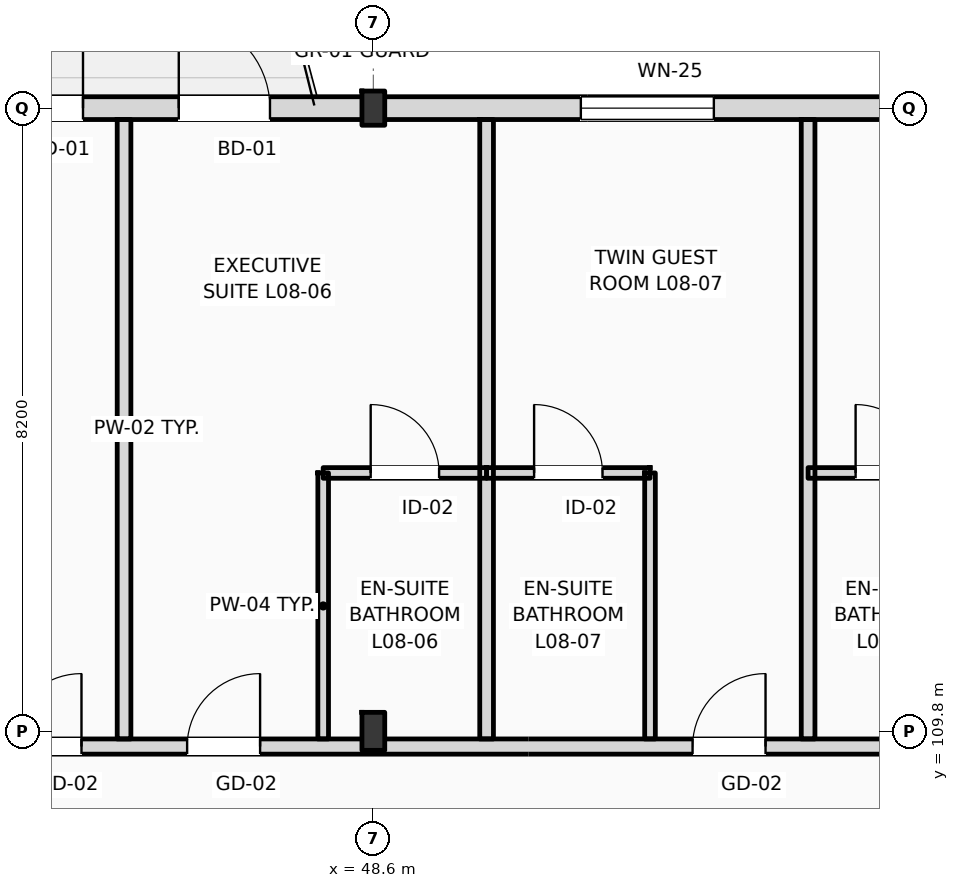
"""IFC4 building model, lengths in metres.
Left out: names, types, materials, properties, quantities, classifications, styles, units other than length and angle.
Written with IfcOpenShell. Run it as: python <this file> out.ifc"""

import sys

from ifc_helpers import new_model, si_unit, direction, frame, frame_2d, origin, origin_2d, place, context, subcontext, project, spatial, rectangle, i_section, extrude, element, fill, save


model = new_model("IFC4")
c1 = context("Model", 3, precision=1e-05, world=origin(), true_north=direction((0.0, 1.0)))
c2 = subcontext(c1, "Body", "Model", "MODEL_VIEW")
j1 = project(units=[si_unit("LENGTHUNIT", "METRE"), si_unit("PLANEANGLEUNIT", "RADIAN")], contexts=[c1])
p1 = place(None, origin())
s1 = spatial("IfcSite", under=j1, at=p1, CompositionType="ELEMENT")
p2 = place(p1, origin())
s2 = spatial("IfcBuilding", under=s1, at=p2, CompositionType="ELEMENT")
p3 = place(p2, frame((0.0, 0.0, 35.4)))
s3 = spatial("IfcBuildingStorey", under=s2, at=p3, CompositionType="ELEMENT", Elevation=35.4)
p4 = place(p3, frame((48.6, 109.8, 0.0), z_axis=(0.0, 0.0, 1.0), x_axis=(1.0, 0.0, 0.0)))
e1 = element("IfcColumn", 1, at=p4, inside=s3, PredefinedType="COLUMN", context=c2, shape_type="SweptSolid", body=[
    extrude(i_section(OverallWidth=0.3, OverallDepth=0.5, WebThickness=0.014, FlangeThickness=0.028, FilletRadius=0.027, at=origin_2d()), origin(), (0.0, 0.0, 1.0), 3.6),
])
p5 = place(p3, frame((48.6, 118.0, 0.0), z_axis=(0.0, 0.0, 1.0), x_axis=(1.0, 0.0, 0.0)))
e2 = element("IfcColumn", 2, at=p5, inside=s3, PredefinedType="COLUMN", context=c2, shape_type="SweptSolid", body=[
    extrude(i_section(OverallWidth=0.3, OverallDepth=0.45, WebThickness=0.014, FlangeThickness=0.026, FilletRadius=0.027, at=origin_2d()), origin(), (0.0, 0.0, 1.0), 3.6),
])
p6 = place(p3, frame((22.5, 118.0, 0.0), z_axis=(0.0, 0.0, 1.0), x_axis=(1.0, 0.0, 0.0)))
e3 = element("IfcWall", 3, at=p6, inside=s3, PredefinedType="STANDARD", context=c2, shape_type="SweptSolid", body=[
    extrude(rectangle(XDim=72.9, YDim=0.3, at=frame_2d((36.45, 0.0))), origin(), (0.0, 0.0, 1.0), 2.92),
])
p7 = place(p6, frame((0.91, 0.0, 0.9)))
e4 = element("IfcOpeningElement", 4, at=p7, cuts=e3, PredefinedType="OPENING", context=c2, shape_type="SweptSolid", body=[
    extrude(rectangle(XDim=0.9, YDim=1.84, at=frame_2d((0.45, 0.92))), frame((0.0, 0.16, 0.0), z_axis=(0.0, -1.0, 0.0), x_axis=(1.0, 0.0, 0.0)), (0.0, 0.0, 1.0), 0.32),
])
p8 = place(p6, frame((6.665, 0.0, 0.0)))
e5 = element("IfcOpeningElement", 5, at=p8, cuts=e3, PredefinedType="OPENING", context=c2, shape_type="SweptSolid", body=[
    extrude(rectangle(XDim=1.2, YDim=2.25, at=frame_2d((0.6, 1.125))), frame((0.0, 0.16, 0.0), z_axis=(0.0, -1.0, 0.0), x_axis=(1.0, 0.0, 0.0)), (0.0, 0.0, 1.0), 0.32),
])
p9 = place(p6, frame((11.355, 0.0, 0.9)))
e6 = element("IfcOpeningElement", 6, at=p9, cuts=e3, PredefinedType="OPENING", context=c2, shape_type="SweptSolid", body=[
    extrude(rectangle(XDim=1.1, YDim=1.5, at=frame_2d((0.55, 0.75))), frame((0.0, 0.16, 0.0), z_axis=(0.0, -1.0, 0.0), x_axis=(1.0, 0.0, 0.0)), (0.0, 0.0, 1.0), 0.32),
])
p10 = place(p6, frame((15.58, 0.0, 0.9)))
e7 = element("IfcOpeningElement", 7, at=p10, cuts=e3, PredefinedType="OPENING", context=c2, shape_type="SweptSolid", body=[
    extrude(rectangle(XDim=1.25, YDim=1.6, at=frame_2d((0.625, 0.8))), frame((0.0, 0.16, 0.0), z_axis=(0.0, -1.0, 0.0), x_axis=(1.0, 0.0, 0.0)), (0.0, 0.0, 1.0), 0.32),
])
p11 = place(p6, frame((21.08, 0.0, 0.0)))
e8 = element("IfcOpeningElement", 8, at=p11, cuts=e3, PredefinedType="OPENING", context=c2, shape_type="SweptSolid", body=[
    extrude(rectangle(XDim=1.2, YDim=2.25, at=frame_2d((0.6, 1.125))), frame((0.0, 0.16, 0.0), z_axis=(0.0, -1.0, 0.0), x_axis=(1.0, 0.0, 0.0)), (0.0, 0.0, 1.0), 0.32),
])
p12 = place(p6, frame((23.54, 0.0, 0.0)))
e9 = element("IfcOpeningElement", 9, at=p12, cuts=e3, PredefinedType="OPENING", context=c2, shape_type="SweptSolid", body=[
    extrude(rectangle(XDim=1.2, YDim=2.25, at=frame_2d((0.6, 1.125))), frame((0.0, 0.16, 0.0), z_axis=(0.0, -1.0, 0.0), x_axis=(1.0, 0.0, 0.0)), (0.0, 0.0, 1.0), 0.32),
])
p13 = place(p6, frame((28.83, 0.0, 0.9)))
e10 = element("IfcOpeningElement", 10, at=p13, cuts=e3, PredefinedType="OPENING", context=c2, shape_type="SweptSolid", body=[
    extrude(rectangle(XDim=1.75, YDim=1.84, at=frame_2d((0.875, 0.92))), frame((0.0, 0.16, 0.0), z_axis=(0.0, -1.0, 0.0), x_axis=(1.0, 0.0, 0.0)), (0.0, 0.0, 1.0), 0.32),
])
p14 = place(p6, frame((34.805, 0.0, 0.9)))
e11 = element("IfcOpeningElement", 11, at=p14, cuts=e3, PredefinedType="OPENING", context=c2, shape_type="SweptSolid", body=[
    extrude(rectangle(XDim=1.35, YDim=1.84, at=frame_2d((0.675, 0.92))), frame((0.0, 0.16, 0.0), z_axis=(0.0, -1.0, 0.0), x_axis=(1.0, 0.0, 0.0)), (0.0, 0.0, 1.0), 0.32),
])
p15 = place(p6, frame((38.105, 0.0, 0.0)))
e12 = element("IfcOpeningElement", 12, at=p15, cuts=e3, PredefinedType="OPENING", context=c2, shape_type="SweptSolid", body=[
    extrude(rectangle(XDim=1.2, YDim=2.25, at=frame_2d((0.6, 1.125))), frame((0.0, 0.16, 0.0), z_axis=(0.0, -1.0, 0.0), x_axis=(1.0, 0.0, 0.0)), (0.0, 0.0, 1.0), 0.32),
])
p16 = place(p6, frame((42.505, 0.0, 0.9)))
e13 = element("IfcOpeningElement", 13, at=p16, cuts=e3, PredefinedType="OPENING", context=c2, shape_type="SweptSolid", body=[
    extrude(rectangle(XDim=2.6, YDim=1.84, at=frame_2d((1.3, 0.92))), frame((0.0, 0.16, 0.0), z_axis=(0.0, -1.0, 0.0), x_axis=(1.0, 0.0, 0.0)), (0.0, 0.0, 1.0), 0.32),
])
p17 = place(p6, frame((46.2, 0.0, 0.9)))
e14 = element("IfcOpeningElement", 14, at=p17, cuts=e3, PredefinedType="OPENING", context=c2, shape_type="SweptSolid", body=[
    extrude(rectangle(XDim=1.8, YDim=1.84, at=frame_2d((0.9, 0.92))), frame((0.0, 0.16, 0.0), z_axis=(0.0, -1.0, 0.0), x_axis=(1.0, 0.0, 0.0)), (0.0, 0.0, 1.0), 0.32),
])
p18 = place(p6, frame((52.565, 0.0, 0.0)))
e15 = element("IfcOpeningElement", 15, at=p18, cuts=e3, PredefinedType="OPENING", context=c2, shape_type="SweptSolid", body=[
    extrude(rectangle(XDim=1.2, YDim=2.25, at=frame_2d((0.6, 1.125))), frame((0.0, 0.16, 0.0), z_axis=(0.0, -1.0, 0.0), x_axis=(1.0, 0.0, 0.0)), (0.0, 0.0, 1.0), 0.32),
])
p19 = place(p6, frame((55.305, 0.0, 0.9)))
e16 = element("IfcOpeningElement", 16, at=p19, cuts=e3, PredefinedType="OPENING", context=c2, shape_type="SweptSolid", body=[
    extrude(rectangle(XDim=1.2, YDim=1.8, at=frame_2d((0.6, 0.9))), frame((0.0, 0.16, 0.0), z_axis=(0.0, -1.0, 0.0), x_axis=(1.0, 0.0, 0.0)), (0.0, 0.0, 1.0), 0.32),
])
p20 = place(p6, frame((60.53, 0.0, 0.9)))
e17 = element("IfcOpeningElement", 17, at=p20, cuts=e3, PredefinedType="OPENING", context=c2, shape_type="SweptSolid", body=[
    extrude(rectangle(XDim=1.35, YDim=1.84, at=frame_2d((0.675, 0.92))), frame((0.0, 0.16, 0.0), z_axis=(0.0, -1.0, 0.0), x_axis=(1.0, 0.0, 0.0)), (0.0, 0.0, 1.0), 0.32),
])
p21 = place(p6, frame((65.955, 0.0, 0.9)))
e18 = element("IfcOpeningElement", 18, at=p21, cuts=e3, PredefinedType="OPENING", context=c2, shape_type="SweptSolid", body=[
    extrude(rectangle(XDim=1.35, YDim=1.84, at=frame_2d((0.675, 0.92))), frame((0.0, 0.16, 0.0), z_axis=(0.0, -1.0, 0.0), x_axis=(1.0, 0.0, 0.0)), (0.0, 0.0, 1.0), 0.32),
])
p22 = place(p6, frame((69.335, 0.0, 0.9)))
e19 = element("IfcOpeningElement", 19, at=p22, cuts=e3, PredefinedType="OPENING", context=c2, shape_type="SweptSolid", body=[
    extrude(rectangle(XDim=1.65, YDim=1.84, at=frame_2d((0.825, 0.92))), frame((0.0, 0.16, 0.0), z_axis=(0.0, -1.0, 0.0), x_axis=(1.0, 0.0, 0.0)), (0.0, 0.0, 1.0), 0.32),
])
p23 = place(p3, frame((10.65, 109.6, 0.0), z_axis=(0.0, 0.0, 1.0), x_axis=(1.0, 0.0, 0.0)))
e20 = element("IfcWall", 20, at=p23, inside=s3, PredefinedType="PARTITIONING", context=c2, shape_type="SweptSolid", body=[
    extrude(rectangle(XDim=84.61, YDim=0.2, at=frame_2d((42.305, 0.0))), origin(), (0.0, 0.0, 1.0), 2.82),
])
p24 = place(p23, frame((12.675, 0.0, 0.0)))
e21 = element("IfcOpeningElement", 21, at=p24, cuts=e20, PredefinedType="OPENING", context=c2, shape_type="SweptSolid", body=[
    extrude(rectangle(XDim=1.02, YDim=2.2, at=frame_2d((0.51, 1.1))), frame((0.0, 0.11, 0.0), z_axis=(0.0, -1.0, 0.0), x_axis=(1.0, 0.0, 0.0)), (0.0, 0.0, 1.0), 0.22),
])
p25 = place(p23, frame((19.62, 0.0, 0.0)))
e22 = element("IfcOpeningElement", 22, at=p25, cuts=e20, PredefinedType="OPENING", context=c2, shape_type="SweptSolid", body=[
    extrude(rectangle(XDim=1.02, YDim=2.2, at=frame_2d((0.51, 1.1))), frame((0.0, 0.11, 0.0), z_axis=(0.0, -1.0, 0.0), x_axis=(1.0, 0.0, 0.0)), (0.0, 0.0, 1.0), 0.22),
])
p26 = place(p23, frame((24.12, 0.0, 0.0)))
e23 = element("IfcOpeningElement", 23, at=p26, cuts=e20, PredefinedType="OPENING", context=c2, shape_type="SweptSolid", body=[
    extrude(rectangle(XDim=1.02, YDim=2.2, at=frame_2d((0.51, 1.1))), frame((0.0, 0.11, 0.0), z_axis=(0.0, -1.0, 0.0), x_axis=(1.0, 0.0, 0.0)), (0.0, 0.0, 1.0), 0.22),
])
p27 = place(p23, frame((26.47, 0.0, 0.0)))
e24 = element("IfcOpeningElement", 24, at=p27, cuts=e20, PredefinedType="OPENING", context=c2, shape_type="SweptSolid", body=[
    extrude(rectangle(XDim=1.02, YDim=2.2, at=frame_2d((0.51, 1.1))), frame((0.0, 0.11, 0.0), z_axis=(0.0, -1.0, 0.0), x_axis=(1.0, 0.0, 0.0)), (0.0, 0.0, 1.0), 0.22),
])
p28 = place(p23, frame((33.15, 0.0, 0.0)))
e25 = element("IfcOpeningElement", 25, at=p28, cuts=e20, PredefinedType="OPENING", context=c2, shape_type="SweptSolid", body=[
    extrude(rectangle(XDim=0.96, YDim=2.2, at=frame_2d((0.48, 1.1))), frame((0.0, 0.11, 0.0), z_axis=(0.0, -1.0, 0.0), x_axis=(1.0, 0.0, 0.0)), (0.0, 0.0, 1.0), 0.22),
])
p29 = place(p23, frame((35.5, 0.0, 0.0)))
e26 = element("IfcOpeningElement", 26, at=p29, cuts=e20, PredefinedType="OPENING", context=c2, shape_type="SweptSolid", body=[
    extrude(rectangle(XDim=0.96, YDim=2.2, at=frame_2d((0.48, 1.1))), frame((0.0, 0.11, 0.0), z_axis=(0.0, -1.0, 0.0), x_axis=(1.0, 0.0, 0.0)), (0.0, 0.0, 1.0), 0.22),
])
p30 = place(p23, frame((42.15, 0.0, 0.0)))
e27 = element("IfcOpeningElement", 27, at=p30, cuts=e20, PredefinedType="OPENING", context=c2, shape_type="SweptSolid", body=[
    extrude(rectangle(XDim=0.96, YDim=2.2, at=frame_2d((0.48, 1.1))), frame((0.0, 0.11, 0.0), z_axis=(0.0, -1.0, 0.0), x_axis=(1.0, 0.0, 0.0)), (0.0, 0.0, 1.0), 0.22),
])
p31 = place(p23, frame((47.15, 0.0, 0.0)))
e28 = element("IfcOpeningElement", 28, at=p31, cuts=e20, PredefinedType="OPENING", context=c2, shape_type="SweptSolid", body=[
    extrude(rectangle(XDim=0.96, YDim=2.2, at=frame_2d((0.48, 1.1))), frame((0.0, 0.11, 0.0), z_axis=(0.0, -1.0, 0.0), x_axis=(1.0, 0.0, 0.0)), (0.0, 0.0, 1.0), 0.22),
])
p32 = place(p23, frame((51.15, 0.0, 0.0)))
e29 = element("IfcOpeningElement", 29, at=p32, cuts=e20, PredefinedType="OPENING", context=c2, shape_type="SweptSolid", body=[
    extrude(rectangle(XDim=0.96, YDim=2.2, at=frame_2d((0.48, 1.1))), frame((0.0, 0.11, 0.0), z_axis=(0.0, -1.0, 0.0), x_axis=(1.0, 0.0, 0.0)), (0.0, 0.0, 1.0), 0.22),
])
p33 = place(p23, frame((55.65, 0.0, 0.0)))
e30 = element("IfcOpeningElement", 30, at=p33, cuts=e20, PredefinedType="OPENING", context=c2, shape_type="SweptSolid", body=[
    extrude(rectangle(XDim=0.96, YDim=2.2, at=frame_2d((0.48, 1.1))), frame((0.0, 0.11, 0.0), z_axis=(0.0, -1.0, 0.0), x_axis=(1.0, 0.0, 0.0)), (0.0, 0.0, 1.0), 0.22),
])
p34 = place(p23, frame((58.0, 0.0, 0.0)))
e31 = element("IfcOpeningElement", 31, at=p34, cuts=e20, PredefinedType="OPENING", context=c2, shape_type="SweptSolid", body=[
    extrude(rectangle(XDim=0.96, YDim=2.2, at=frame_2d((0.48, 1.1))), frame((0.0, 0.11, 0.0), z_axis=(0.0, -1.0, 0.0), x_axis=(1.0, 0.0, 0.0)), (0.0, 0.0, 1.0), 0.22),
])
p35 = place(p23, frame((64.65, 0.0, 0.0)))
e32 = element("IfcOpeningElement", 32, at=p35, cuts=e20, PredefinedType="OPENING", context=c2, shape_type="SweptSolid", body=[
    extrude(rectangle(XDim=0.96, YDim=2.2, at=frame_2d((0.48, 1.1))), frame((0.0, 0.11, 0.0), z_axis=(0.0, -1.0, 0.0), x_axis=(1.0, 0.0, 0.0)), (0.0, 0.0, 1.0), 0.22),
])
p36 = place(p23, frame((66.75, 0.0, 0.0)))
e33 = element("IfcOpeningElement", 33, at=p36, cuts=e20, PredefinedType="OPENING", context=c2, shape_type="SweptSolid", body=[
    extrude(rectangle(XDim=0.96, YDim=2.2, at=frame_2d((0.48, 1.1))), frame((0.0, 0.11, 0.0), z_axis=(0.0, -1.0, 0.0), x_axis=(1.0, 0.0, 0.0)), (0.0, 0.0, 1.0), 0.22),
])
p37 = place(p23, frame((73.65, 0.0, 0.0)))
e34 = element("IfcOpeningElement", 34, at=p37, cuts=e20, PredefinedType="OPENING", context=c2, shape_type="SweptSolid", body=[
    extrude(rectangle(XDim=0.96, YDim=2.2, at=frame_2d((0.48, 1.1))), frame((0.0, 0.11, 0.0), z_axis=(0.0, -1.0, 0.0), x_axis=(1.0, 0.0, 0.0)), (0.0, 0.0, 1.0), 0.22),
])
p38 = place(p23, frame((78.4, 0.0, 0.0)))
e35 = element("IfcOpeningElement", 35, at=p38, cuts=e20, PredefinedType="OPENING", context=c2, shape_type="SweptSolid", body=[
    extrude(rectangle(XDim=0.96, YDim=2.2, at=frame_2d((0.48, 1.1))), frame((0.0, 0.11, 0.0), z_axis=(0.0, -1.0, 0.0), x_axis=(1.0, 0.0, 0.0)), (0.0, 0.0, 1.0), 0.22),
])
p39 = place(p23, frame((80.455, 0.0, 0.0)))
e36 = element("IfcOpeningElement", 36, at=p39, cuts=e20, PredefinedType="OPENING", context=c2, shape_type="SweptSolid", body=[
    extrude(rectangle(XDim=0.96, YDim=2.2, at=frame_2d((0.48, 1.1))), frame((0.0, 0.11, 0.0), z_axis=(0.0, -1.0, 0.0), x_axis=(1.0, 0.0, 0.0)), (0.0, 0.0, 1.0), 0.22),
])
p40 = place(p23, frame((2.716, 0.0, 0.0)))
e37 = element("IfcOpeningElement", 37, at=p40, cuts=e20, PredefinedType="OPENING", context=c2, shape_type="SweptSolid", body=[
    extrude(rectangle(XDim=1.35, YDim=2.25, at=frame_2d((0.675, 1.125))), frame((0.0, 0.11, 0.0), z_axis=(0.0, -1.0, 0.0), x_axis=(1.0, 0.0, 0.0)), (0.0, 0.0, 1.0), 0.22),
])
p41 = place(p23, frame((6.65, 0.0, 0.0)))
e38 = element("IfcOpeningElement", 38, at=p41, cuts=e20, PredefinedType="OPENING", context=c2, shape_type="SweptSolid", body=[
    extrude(rectangle(XDim=1.35, YDim=2.25, at=frame_2d((0.675, 1.125))), frame((0.0, 0.11, 0.0), z_axis=(0.0, -1.0, 0.0), x_axis=(1.0, 0.0, 0.0)), (0.0, 0.0, 1.0), 0.22),
])
p42 = place(p23, frame((10.583, 0.0, 0.0)))
e39 = element("IfcOpeningElement", 39, at=p42, cuts=e20, PredefinedType="OPENING", context=c2, shape_type="SweptSolid", body=[
    extrude(rectangle(XDim=1.35, YDim=2.25, at=frame_2d((0.675, 1.125))), frame((0.0, 0.11, 0.0), z_axis=(0.0, -1.0, 0.0), x_axis=(1.0, 0.0, 0.0)), (0.0, 0.0, 1.0), 0.22),
])
for number, where, z_axis, x_axis in (
    (40, (45.32, 109.7, 0.0), (0.0, 0.0, 1.0), (0.0, 1.0, 0.0)),
    (41, (50.09, 109.7, 0.0), (0.0, 0.0, 1.0), (0.0, 1.0, 0.0)),
):
    element("IfcWall", number, at=place(p3, frame(where, z_axis=z_axis, x_axis=x_axis)), inside=s3, PredefinedType="PARTITIONING", context=c2, shape_type="SweptSolid", body=[
        extrude(rectangle(XDim=8.15, YDim=0.18, at=frame_2d((4.075, 0.0))), origin(), (0.0, 0.0, 1.0), 3.38),
    ])
p43 = place(p3, frame((47.94, 109.7, 0.0), z_axis=(0.0, 0.0, 1.0), x_axis=(0.0, 1.0, 0.0)))
e42 = element("IfcWall", 42, at=p43, inside=s3, PredefinedType="PARTITIONING", context=c2, shape_type="SweptSolid", body=[
    extrude(rectangle(XDim=3.5, YDim=0.14, at=frame_2d((1.75, 0.0))), origin(), (0.0, 0.0, 1.0), 3.38),
])
p44 = place(p3, frame((47.94, 113.2, 0.0), z_axis=(0.0, 0.0, 1.0), x_axis=(1.0, 0.0, 0.0)))
e43 = element("IfcWall", 43, at=p44, inside=s3, PredefinedType="PARTITIONING", context=c2, shape_type="SweptSolid", body=[
    extrude(rectangle(XDim=2.15, YDim=0.14, at=frame_2d((1.075, 0.0))), origin(), (0.0, 0.0, 1.0), 3.38),
])
p45 = place(p44, frame((0.625, 0.0, 0.0)))
e44 = element("IfcOpeningElement", 44, at=p45, cuts=e43, PredefinedType="OPENING", context=c2, shape_type="SweptSolid", body=[
    extrude(rectangle(XDim=0.9, YDim=2.1, at=frame_2d((0.45, 1.05))), frame((0.0, 0.08, 0.0), z_axis=(0.0, -1.0, 0.0), x_axis=(1.0, 0.0, 0.0)), (0.0, 0.0, 1.0), 0.16),
])
p46 = place(p3, frame((54.32, 109.7, 0.0), z_axis=(0.0, 0.0, 1.0), x_axis=(0.0, 1.0, 0.0)))
e45 = element("IfcWall", 45, at=p46, inside=s3, PredefinedType="PARTITIONING", context=c2, shape_type="SweptSolid", body=[
    extrude(rectangle(XDim=8.15, YDim=0.18, at=frame_2d((4.075, 0.0))), origin(), (0.0, 0.0, 1.0), 3.38),
])
p47 = place(p3, frame((52.24, 109.7, 0.0), z_axis=(0.0, 0.0, 1.0), x_axis=(0.0, 1.0, 0.0)))
e46 = element("IfcWall", 46, at=p47, inside=s3, PredefinedType="PARTITIONING", context=c2, shape_type="SweptSolid", body=[
    extrude(rectangle(XDim=3.5, YDim=0.14, at=frame_2d((1.75, 0.0))), origin(), (0.0, 0.0, 1.0), 3.38),
])
p48 = place(p3, frame((50.09, 113.2, 0.0), z_axis=(0.0, 0.0, 1.0), x_axis=(1.0, 0.0, 0.0)))
e47 = element("IfcWall", 47, at=p48, inside=s3, PredefinedType="PARTITIONING", context=c2, shape_type="SweptSolid", body=[
    extrude(rectangle(XDim=2.15, YDim=0.14, at=frame_2d((1.075, 0.0))), origin(), (0.0, 0.0, 1.0), 3.38),
])
p49 = place(p48, frame((0.625, 0.0, 0.0)))
e48 = element("IfcOpeningElement", 48, at=p49, cuts=e47, PredefinedType="OPENING", context=c2, shape_type="SweptSolid", body=[
    extrude(rectangle(XDim=0.9, YDim=2.1, at=frame_2d((0.45, 1.05))), frame((0.0, 0.08, 0.0), z_axis=(0.0, -1.0, 0.0), x_axis=(1.0, 0.0, 0.0)), (0.0, 0.0, 1.0), 0.16),
])
p50 = place(p3, frame((54.32, 113.2, 0.0), z_axis=(0.0, 0.0, 1.0), x_axis=(1.0, 0.0, 0.0)))
e49 = element("IfcWall", 49, at=p50, inside=s3, PredefinedType="PARTITIONING", context=c2, shape_type="SweptSolid", body=[
    extrude(rectangle(XDim=2.15, YDim=0.14, at=frame_2d((1.075, 0.0))), origin(), (0.0, 0.0, 1.0), 3.38),
])
p51 = place(p50, frame((0.625, 0.0, 0.0)))
e50 = element("IfcOpeningElement", 50, at=p51, cuts=e49, PredefinedType="OPENING", context=c2, shape_type="SweptSolid", body=[
    extrude(rectangle(XDim=0.9, YDim=2.1, at=frame_2d((0.45, 1.05))), frame((0.0, 0.08, 0.0), z_axis=(0.0, -1.0, 0.0), x_axis=(1.0, 0.0, 0.0)), (0.0, 0.0, 1.0), 0.16),
])
p52 = place(p11, origin())
e51 = element("IfcDoor", 51, at=p52, inside=s3, OperationType="SINGLE_SWING_RIGHT", PredefinedType="DOOR", context=c2, shape_type="SweptSolid", body=[
    extrude(rectangle(XDim=1.2, YDim=2.25, at=frame_2d((0.6, 1.125))), frame((0.0, 0.025, 0.0), z_axis=(0.0, -1.0, 0.0), x_axis=(1.0, 0.0, 0.0)), (0.0, 0.0, 1.0), 0.05),
])
fill(e8, e51)
p53 = place(p12, origin())
e52 = element("IfcDoor", 52, at=p53, inside=s3, OperationType="SINGLE_SWING_LEFT", PredefinedType="DOOR", context=c2, shape_type="SweptSolid", body=[
    extrude(rectangle(XDim=1.2, YDim=2.25, at=frame_2d((0.6, 1.125))), frame((0.0, 0.025, 0.0), z_axis=(0.0, -1.0, 0.0), x_axis=(1.0, 0.0, 0.0)), (0.0, 0.0, 1.0), 0.05),
])
fill(e9, e52)
p54 = place(p13, origin())
e53 = element("IfcWindow", 53, at=p54, inside=s3, PartitioningType="DOUBLE_PANEL_VERTICAL", PredefinedType="WINDOW", context=c2, shape_type="SweptSolid", body=[
    extrude(rectangle(XDim=1.75, YDim=1.84, at=frame_2d((0.875, 0.92))), frame((0.0, 0.03, 0.0), z_axis=(0.0, -1.0, 0.0), x_axis=(1.0, 0.0, 0.0)), (0.0, 0.0, 1.0), 0.06),
])
fill(e10, e53)
p55 = place(p28, origin())
e54 = element("IfcDoor", 54, at=p55, inside=s3, OperationType="SINGLE_SWING_RIGHT", PredefinedType="DOOR", context=c2, shape_type="SweptSolid", body=[
    extrude(rectangle(XDim=0.96, YDim=2.2, at=frame_2d((0.48, 1.1))), frame((0.0, 0.025, 0.0), z_axis=(0.0, -1.0, 0.0), x_axis=(1.0, 0.0, 0.0)), (0.0, 0.0, 1.0), 0.05),
])
fill(e25, e54)
p56 = place(p29, origin())
e55 = element("IfcDoor", 55, at=p56, inside=s3, OperationType="SINGLE_SWING_RIGHT", PredefinedType="DOOR", context=c2, shape_type="SweptSolid", body=[
    extrude(rectangle(XDim=0.96, YDim=2.2, at=frame_2d((0.48, 1.1))), frame((0.0, 0.025, 0.0), z_axis=(0.0, -1.0, 0.0), x_axis=(1.0, 0.0, 0.0)), (0.0, 0.0, 1.0), 0.05),
])
fill(e26, e55)
p57 = place(p45, origin())
e56 = element("IfcDoor", 56, at=p57, inside=s3, OperationType="SINGLE_SWING_LEFT", PredefinedType="DOOR", context=c2, shape_type="SweptSolid", body=[
    extrude(rectangle(XDim=0.9, YDim=2.1, at=frame_2d((0.45, 1.05))), frame((0.0, 0.025, 0.0), z_axis=(0.0, -1.0, 0.0), x_axis=(1.0, 0.0, 0.0)), (0.0, 0.0, 1.0), 0.05),
])
fill(e44, e56)
p58 = place(p30, origin())
e57 = element("IfcDoor", 57, at=p58, inside=s3, OperationType="SINGLE_SWING_RIGHT", PredefinedType="DOOR", context=c2, shape_type="SweptSolid", body=[
    extrude(rectangle(XDim=0.96, YDim=2.2, at=frame_2d((0.48, 1.1))), frame((0.0, 0.025, 0.0), z_axis=(0.0, -1.0, 0.0), x_axis=(1.0, 0.0, 0.0)), (0.0, 0.0, 1.0), 0.05),
])
fill(e27, e57)
p59 = place(p49, origin())
e58 = element("IfcDoor", 58, at=p59, inside=s3, OperationType="SINGLE_SWING_LEFT", PredefinedType="DOOR", context=c2, shape_type="SweptSolid", body=[
    extrude(rectangle(XDim=0.9, YDim=2.1, at=frame_2d((0.45, 1.05))), frame((0.0, 0.025, 0.0), z_axis=(0.0, -1.0, 0.0), x_axis=(1.0, 0.0, 0.0)), (0.0, 0.0, 1.0), 0.05),
])
fill(e48, e58)
p60 = place(p51, origin())
e59 = element("IfcDoor", 59, at=p60, inside=s3, OperationType="SINGLE_SWING_LEFT", PredefinedType="DOOR", context=c2, shape_type="SweptSolid", body=[
    extrude(rectangle(XDim=0.9, YDim=2.1, at=frame_2d((0.45, 1.05))), frame((0.0, 0.025, 0.0), z_axis=(0.0, -1.0, 0.0), x_axis=(1.0, 0.0, 0.0)), (0.0, 0.0, 1.0), 0.05),
])
fill(e50, e59)
save(model, sys.argv[1])
